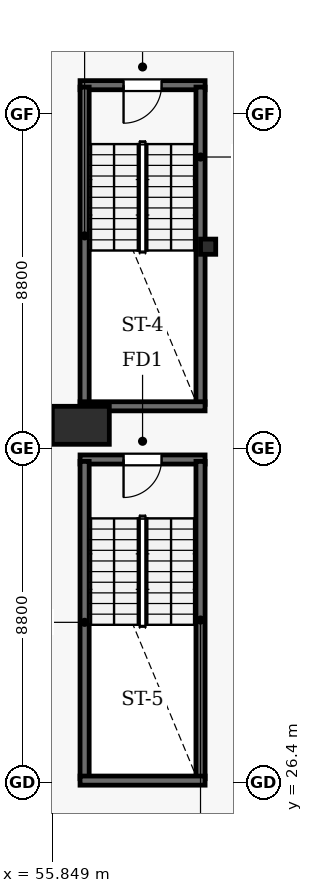
"""IFC4 building model, lengths in metres.
Left out: names, types, materials, properties, quantities, classifications, styles, units other than length and angle.
Written with IfcOpenShell. Run it as: python <this file> out.ifc"""

import sys

from ifc_helpers import new_model, si_unit, direction, frame, frame_2d, origin, origin_2d, place, context, subcontext, project, spatial, rectangle, i_section, extrude, element, fill, save


model = new_model("IFC4")
c1 = context("Model", 3, precision=1e-05, world=origin(), true_north=direction((0.0, 1.0)))
c2 = subcontext(c1, "Body", "Model", "MODEL_VIEW")
j1 = project(units=[si_unit("LENGTHUNIT", "METRE"), si_unit("PLANEANGLEUNIT", "RADIAN")], contexts=[c1])
p1 = place(None, origin())
s1 = spatial("IfcSite", under=j1, at=p1, CompositionType="ELEMENT")
p2 = place(p1, origin())
s2 = spatial("IfcBuilding", under=s1, at=p2, CompositionType="ELEMENT")
p3 = place(p2, frame((0.0, 0.0, -11.7)))
s3 = spatial("IfcBuildingStorey", under=s2, at=p3, CompositionType="ELEMENT", Elevation=-11.7)
p4 = place(p3, frame((56.6, 35.8, 0.0), z_axis=(0.0, 0.0, 1.0), x_axis=(1.0, 0.0, 0.0)))
e1 = element("IfcColumn", 1, at=p4, inside=s3, PredefinedType="COLUMN", context=c2, shape_type="SweptSolid", body=[
    extrude(rectangle(XDim=1.5, YDim=1.0, at=origin_2d()), origin(), (0.0, 0.0, 1.0), 3.9),
])
p5 = place(p3, frame((59.95, 40.5, 0.0), z_axis=(0.0, 0.0, 1.0), x_axis=(1.0, 0.0, 0.0)))
e2 = element("IfcColumn", 2, at=p5, inside=s3, PredefinedType="PILASTER", context=c2, shape_type="SweptSolid", body=[
    extrude(i_section(OverallWidth=0.4, OverallDepth=0.4, WebThickness=0.013, FlangeThickness=0.021, FilletRadius=0.022, at=origin_2d()), origin(), (0.0, 0.0, 1.0), 3.9),
])
p6 = place(p3, frame((56.58, 44.75, 0.0), z_axis=(0.0, 0.0, 1.0), x_axis=(1.0, 0.0, 0.0)))
e3 = element("IfcWall", 3, at=p6, inside=s3, PredefinedType="SHEAR", context=c2, shape_type="SweptSolid", body=[
    extrude(rectangle(XDim=3.29, YDim=0.24, at=frame_2d((1.645, 0.0))), origin(), (0.0, 0.0, 1.0), 3.58),
])
p7 = place(p6, frame((1.145, 0.0, 0.0)))
e4 = element("IfcOpeningElement", 4, at=p7, cuts=e3, PredefinedType="OPENING", context=c2, shape_type="SweptSolid", body=[
    extrude(rectangle(XDim=1.0, YDim=2.15, at=frame_2d((0.5, 1.075))), frame((0.0, 0.13, 0.0), z_axis=(0.0, -1.0, 0.0), x_axis=(1.0, 0.0, 0.0)), (0.0, 0.0, 1.0), 0.26),
])
p8 = place(p3, frame((56.58, 34.9, 0.0), z_axis=(0.0, 0.0, 1.0), x_axis=(1.0, 0.0, 0.0)))
e5 = element("IfcWall", 5, at=p8, inside=s3, PredefinedType="SHEAR", context=c2, shape_type="SweptSolid", body=[
    extrude(rectangle(XDim=3.29, YDim=0.24, at=frame_2d((1.645, 0.0))), origin(), (0.0, 0.0, 1.0), 3.58),
])
p9 = place(p8, frame((1.145, 0.0, 0.0)))
e6 = element("IfcOpeningElement", 6, at=p9, cuts=e5, PredefinedType="OPENING", context=c2, shape_type="SweptSolid", body=[
    extrude(rectangle(XDim=1.0, YDim=2.15, at=frame_2d((0.5, 1.075))), frame((0.0, 0.13, 0.0), z_axis=(0.0, -1.0, 0.0), x_axis=(1.0, 0.0, 0.0)), (0.0, 0.0, 1.0), 0.26),
])
for number, where, z_axis, x_axis in (
    (7, (56.7, 36.35, 0.0), (0.0, 0.0, 1.0), (0.0, 1.0, 0.0)),
    (8, (59.75, 36.35, 0.0), (0.0, 0.0, 1.0), (0.0, 1.0, 0.0)),
):
    element("IfcWall", number, at=place(p3, frame(where, z_axis=z_axis, x_axis=x_axis)), inside=s3, PredefinedType="SHEAR", context=c2, shape_type="SweptSolid", body=[
        extrude(rectangle(XDim=8.35, YDim=0.24, at=frame_2d((4.175, 0.0))), origin(), (0.0, 0.0, 1.0), 3.58),
    ])
for number, where, z_axis, x_axis in (
    (9, (56.7, 26.5, 0.0), (0.0, 0.0, 1.0), (0.0, 1.0, 0.0)),
    (10, (59.75, 26.5, 0.0), (0.0, 0.0, 1.0), (0.0, 1.0, 0.0)),
):
    element("IfcWall", number, at=place(p3, frame(where, z_axis=z_axis, x_axis=x_axis)), inside=s3, PredefinedType="SHEAR", context=c2, shape_type="SweptSolid", body=[
        extrude(rectangle(XDim=8.35, YDim=0.24, at=frame_2d((4.175, 0.0))), origin(), (0.0, 0.0, 1.0), 3.58),
    ])
for number, where, z_axis, x_axis in (
    (11, (56.58, 36.3, 0.0), (0.0, 0.0, 1.0), (1.0, 0.0, 0.0)),
    (12, (56.58, 26.45, 0.0), (0.0, 0.0, 1.0), (1.0, 0.0, 0.0)),
):
    element("IfcWall", number, at=place(p3, frame(where, z_axis=z_axis, x_axis=x_axis)), inside=s3, PredefinedType="SHEAR", context=c2, shape_type="SweptSolid", body=[
        extrude(rectangle(XDim=3.29, YDim=0.24, at=frame_2d((1.645, 0.0))), origin(), (0.0, 0.0, 1.0), 3.58),
    ])
p10 = place(p7, frame((1.0, 0.0, 0.0), z_axis=(0.0, 0.0, 1.0), x_axis=(-1.0, 0.0, 0.0)))
e13 = element("IfcDoor", 13, at=p10, inside=s3, OperationType="SINGLE_SWING_LEFT", PredefinedType="DOOR", context=c2, shape_type="SweptSolid", body=[
    extrude(rectangle(XDim=1.0, YDim=2.15, at=frame_2d((0.5, 1.075))), frame((0.0, 0.025, 0.0), z_axis=(0.0, -1.0, 0.0), x_axis=(1.0, 0.0, 0.0)), (0.0, 0.0, 1.0), 0.05),
])
fill(e4, e13)
p11 = place(p9, frame((1.0, 0.0, 0.0), z_axis=(0.0, 0.0, 1.0), x_axis=(-1.0, 0.0, 0.0)))
e14 = element("IfcDoor", 14, at=p11, inside=s3, OperationType="SINGLE_SWING_LEFT", PredefinedType="DOOR", context=c2, shape_type="SweptSolid", body=[
    extrude(rectangle(XDim=1.0, YDim=2.15, at=frame_2d((0.5, 1.075))), frame((0.0, 0.025, 0.0), z_axis=(0.0, -1.0, 0.0), x_axis=(1.0, 0.0, 0.0)), (0.0, 0.0, 1.0), 0.05),
])
fill(e6, e14)
save(model, sys.argv[1])
